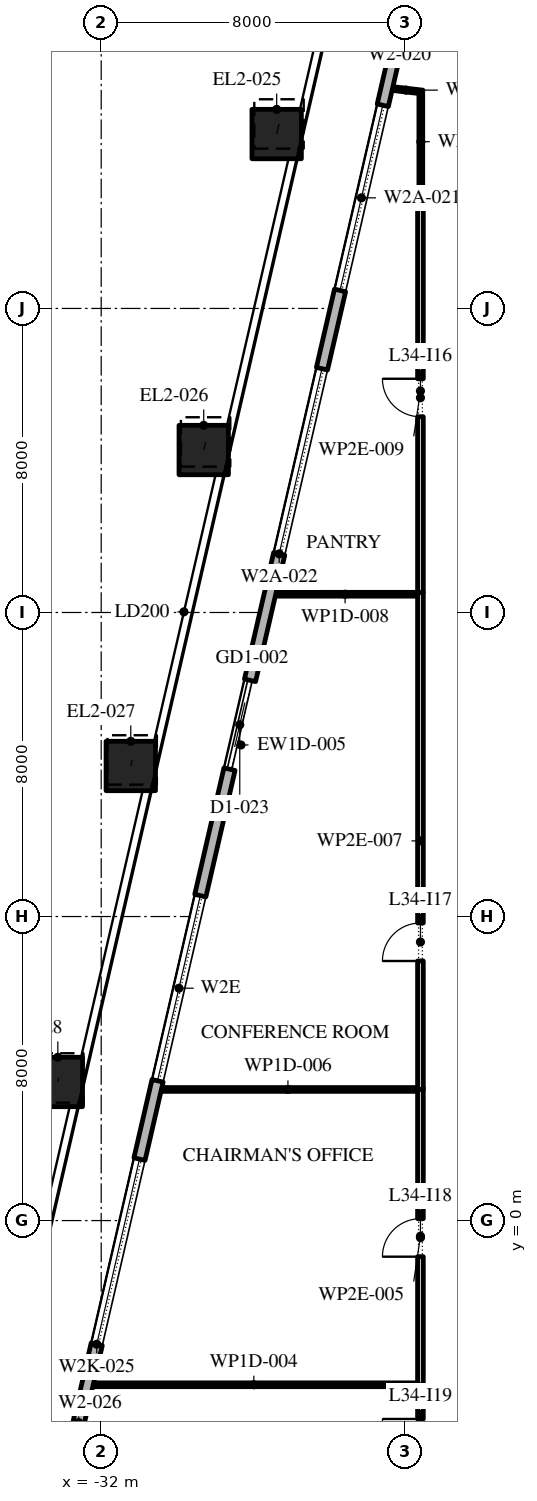
"""IFC4 building model, lengths in metres.
Left out: names, types, materials, properties, quantities, classifications, styles, units other than length and angle.
Written with IfcOpenShell. Run it as: python <this file> out.ifc"""

import sys

from ifc_helpers import new_model, si_unit, direction, frame, frame_2d, origin, origin_2d, place, context, subcontext, project, spatial, rectangle, extrude, element, fill, save


model = new_model("IFC4")
c1 = context("Model", 3, precision=1e-05, world=origin(), true_north=direction((0.0, 1.0)))
c2 = subcontext(c1, "Body", "Model", "MODEL_VIEW")
j1 = project(units=[si_unit("LENGTHUNIT", "METRE"), si_unit("PLANEANGLEUNIT", "RADIAN")], contexts=[c1])
p1 = place(None, origin())
s1 = spatial("IfcSite", under=j1, at=p1, CompositionType="ELEMENT")
p2 = place(p1, origin())
s2 = spatial("IfcBuilding", under=s1, at=p2, CompositionType="ELEMENT")
p3 = place(p2, frame((0.0, 0.0, 156.0)))
s3 = spatial("IfcBuildingStorey", under=s2, at=p3, CompositionType="ELEMENT", Elevation=156.0)
p4 = place(p3, frame((-27.383, 28.588, 0.0), z_axis=(0.014559841898, 0.063111984005, 0.997900239743), x_axis=(-0.97440628778, 0.224794097641, 0.0)))
e1 = element("IfcColumn", 1, at=p4, inside=s3, PredefinedType="COLUMN", context=c2, shape_type="SweptSolid", body=[
    extrude(rectangle(XDim=1.3, YDim=1.3, at=origin_2d()), origin(), (0.0, 0.0, 1.0), 4.209),
])
p5 = place(p3, frame((-29.302, 20.274, 0.0), z_axis=(0.011668267153, 0.050562490995, 0.998652735462), x_axis=(-0.974391195695, 0.224859506699, 0.0)))
e2 = element("IfcColumn", 2, at=p5, inside=s3, PredefinedType="COLUMN", context=c2, shape_type="SweptSolid", body=[
    extrude(rectangle(XDim=1.3, YDim=1.3, at=origin_2d()), origin(), (0.0, 0.0, 1.0), 4.206),
])
p6 = place(p3, frame((-31.222, 11.961, 0.0), z_axis=(0.00871280379, 0.037929739166, 0.999242424008), x_axis=(-0.974617095667, 0.223878352757, 0.0)))
e3 = element("IfcColumn", 3, at=p6, inside=s3, PredefinedType="COLUMN", context=c2, shape_type="SweptSolid", body=[
    extrude(rectangle(XDim=1.3, YDim=1.3, at=origin_2d()), origin(), (0.0, 0.0, 1.0), 4.203),
])
p7 = place(p3, frame((-33.141, 3.647, 0.0), z_axis=(0.005810975449, 0.025335852957, 0.999662106474), x_axis=(-0.974691740237, 0.22355315143, 0.0)))
e4 = element("IfcColumn", 4, at=p7, inside=s3, PredefinedType="COLUMN", context=c2, shape_type="SweptSolid", body=[
    extrude(rectangle(XDim=1.3, YDim=1.3, at=origin_2d()), origin(), (0.0, 0.0, 1.0), 4.201),
])
p8 = place(p3, frame((-24.416, 29.795, 0.0), z_axis=(0.0, 0.0, 1.0), x_axis=(0.993440426076, -0.114350862868, 0.0)))
e5 = element("IfcWall", 5, at=p8, inside=s3, PredefinedType="PARTITIONING", context=c2, shape_type="SweptSolid", body=[
    extrude(rectangle(XDim=0.882, YDim=0.1, at=frame_2d((0.441, 0.0))), origin(), (0.0, 0.0, 1.0), 3.9),
])
p9 = place(p3, frame((-23.6, -7.375, 0.0), z_axis=(0.0, 0.0, 1.0), x_axis=(0.0, 1.0, 0.0)))
e6 = element("IfcWall", 6, at=p9, inside=s3, PredefinedType="PARTITIONING", context=c2, shape_type="SweptSolid", body=[
    extrude(rectangle(XDim=3.055, YDim=0.15, at=frame_2d((1.527, 0.0))), origin(), (0.0, 0.0, 1.0), 3.9),
])
p10 = place(p9, frame((1.155, 0.0, 0.0)))
e7 = element("IfcOpeningElement", 7, at=p10, cuts=e6, PredefinedType="OPENING", context=c2, shape_type="SweptSolid", body=[
    extrude(rectangle(XDim=1.0, YDim=2.1, at=frame_2d((0.5, 1.05))), frame((0.0, 0.085, 0.0), z_axis=(0.0, -1.0, 0.0), x_axis=(1.0, 0.0, 0.0)), (0.0, 0.0, 1.0), 0.17),
])
p11 = place(p3, frame((-23.675, -4.32, 0.0), z_axis=(0.0, 0.0, 1.0), x_axis=(-1.0, 0.0, 0.0)))
e8 = element("IfcWall", 8, at=p11, inside=s3, PredefinedType="PARTITIONING", context=c2, shape_type="SweptSolid", body=[
    extrude(rectangle(XDim=8.617, YDim=0.1, at=frame_2d((4.309, 0.0))), origin(), (0.0, 0.0, 1.0), 3.9),
])
p12 = place(p3, frame((-23.6, -4.32, 0.0), z_axis=(0.0, 0.0, 1.0), x_axis=(0.0, 1.0, 0.0)))
e9 = element("IfcWall", 9, at=p12, inside=s3, PredefinedType="PARTITIONING", context=c2, shape_type="SweptSolid", body=[
    extrude(rectangle(XDim=7.82, YDim=0.15, at=frame_2d((3.91, 0.0))), origin(), (0.0, 0.0, 1.0), 3.9),
])
p13 = place(p12, frame((3.37, 0.0, 0.0)))
e10 = element("IfcOpeningElement", 10, at=p13, cuts=e9, PredefinedType="OPENING", context=c2, shape_type="SweptSolid", body=[
    extrude(rectangle(XDim=1.0, YDim=2.1, at=frame_2d((0.5, 1.05))), frame((0.0, 0.085, 0.0), z_axis=(0.0, -1.0, 0.0), x_axis=(1.0, 0.0, 0.0)), (0.0, 0.0, 1.0), 0.17),
])
p14 = place(p3, frame((-23.675, 3.45, 0.0), z_axis=(0.0, 0.0, 1.0), x_axis=(-1.0, 0.0, 0.0)))
e11 = element("IfcWall", 11, at=p14, inside=s3, PredefinedType="PARTITIONING", context=c2, shape_type="SweptSolid", body=[
    extrude(rectangle(XDim=6.823, YDim=0.1, at=frame_2d((3.412, 0.0))), origin(), (0.0, 0.0, 1.0), 3.9),
])
p15 = place(p3, frame((-23.6, 3.45, 0.0), z_axis=(0.0, 0.0, 1.0), x_axis=(0.0, 1.0, 0.0)))
e12 = element("IfcWall", 12, at=p15, inside=s3, PredefinedType="PARTITIONING", context=c2, shape_type="SweptSolid", body=[
    extrude(rectangle(XDim=13.08, YDim=0.15, at=frame_2d((6.54, 0.0))), origin(), (0.0, 0.0, 1.0), 3.9),
])
p16 = place(p15, frame((3.38, 0.0, 0.0)))
e13 = element("IfcOpeningElement", 13, at=p16, cuts=e12, PredefinedType="OPENING", context=c2, shape_type="SweptSolid", body=[
    extrude(rectangle(XDim=1.0, YDim=2.1, at=frame_2d((0.5, 1.05))), frame((0.0, 0.085, 0.0), z_axis=(0.0, -1.0, 0.0), x_axis=(1.0, 0.0, 0.0)), (0.0, 0.0, 1.0), 0.17),
])
p17 = place(p3, frame((-23.675, 16.48, 0.0), z_axis=(0.0, 0.0, 1.0), x_axis=(-1.0, 0.0, 0.0)))
e14 = element("IfcWall", 14, at=p17, inside=s3, PredefinedType="PARTITIONING", context=c2, shape_type="SweptSolid", body=[
    extrude(rectangle(XDim=3.815, YDim=0.1, at=frame_2d((1.907, 0.0))), origin(), (0.0, 0.0, 1.0), 3.9),
])
p18 = place(p3, frame((-23.6, 16.53, 0.0), z_axis=(0.0, 0.0, 1.0), x_axis=(0.0, 1.0, 0.0)))
e15 = element("IfcWall", 15, at=p18, inside=s3, PredefinedType="PARTITIONING", context=c2, shape_type="SweptSolid", body=[
    extrude(rectangle(XDim=10.595, YDim=0.15, at=frame_2d((5.297, 0.0))), origin(), (0.0, 0.0, 1.0), 3.9),
])
p19 = place(p18, frame((4.62, 0.0, 0.0)))
e16 = element("IfcOpeningElement", 16, at=p19, cuts=e15, PredefinedType="OPENING", context=c2, shape_type="SweptSolid", body=[
    extrude(rectangle(XDim=1.0, YDim=2.1, at=frame_2d((0.5, 1.05))), frame((0.0, 0.085, 0.0), z_axis=(0.0, -1.0, 0.0), x_axis=(1.0, 0.0, 0.0)), (0.0, 0.0, 1.0), 0.17),
])
p20 = place(p3, frame((-23.59, 27.125, 0.0), z_axis=(0.0, 0.0, 1.0), x_axis=(0.0, 1.0, 0.0)))
e17 = element("IfcWall", 17, at=p20, inside=s3, PredefinedType="PARTITIONING", context=c2, shape_type="SweptSolid", body=[
    extrude(rectangle(XDim=2.525, YDim=0.1, at=frame_2d((1.262, 0.0))), origin(), (0.0, 0.0, 1.0), 3.9),
])
p21 = place(p3, frame((-23.515, 27.05, 0.0), z_axis=(0.0, 0.0, 1.0), x_axis=(1.0, 0.0, 0.0)))
e18 = element("IfcWall", 18, at=p21, inside=s3, PredefinedType="PARTITIONING", context=c2, shape_type="SweptSolid", body=[
    extrude(rectangle(XDim=8.895, YDim=0.15, at=frame_2d((4.447, 0.0))), origin(), (0.0, 0.0, 1.0), 3.9),
])
p22 = place(p21, frame((4.695, 0.0, 0.0)))
e19 = element("IfcOpeningElement", 19, at=p22, cuts=e18, PredefinedType="OPENING", context=c2, shape_type="SweptSolid", body=[
    extrude(rectangle(XDim=1.0, YDim=2.1, at=frame_2d((0.5, 1.05))), frame((0.0, 0.085, 0.0), z_axis=(0.0, -1.0, 0.0), x_axis=(1.0, 0.0, 0.0)), (0.0, 0.0, 1.0), 0.17),
])
p23 = place(p3, frame((-22.983, 36.311, 0.0), z_axis=(0.0, 0.0, 1.0), x_axis=(-0.224952722155, -0.974369679739, 0.0)))
e20 = element("IfcWall", 20, at=p23, inside=s3, PredefinedType="STANDARD", context=c2, shape_type="SweptSolid", body=[
    extrude(rectangle(XDim=48.777, YDim=0.3, at=frame_2d((24.388, 0.0))), origin(), (0.0, 0.0, 1.0), 3.9),
])
p24 = place(p23, frame((0.184, 0.0, 0.45)))
e21 = element("IfcOpeningElement", 21, at=p24, cuts=e20, PredefinedType="OPENING", context=c2, shape_type="SweptSolid", body=[
    extrude(rectangle(XDim=5.0, YDim=3.25, at=frame_2d((2.5, 1.625))), frame((0.0, 0.16, 0.0), z_axis=(0.0, -1.0, 0.0), x_axis=(1.0, 0.0, 0.0)), (0.0, 0.0, 1.0), 0.32),
])
p25 = place(p23, frame((7.148, 0.0, 0.45)))
e22 = element("IfcOpeningElement", 22, at=p25, cuts=e20, PredefinedType="OPENING", context=c2, shape_type="SweptSolid", body=[
    extrude(rectangle(XDim=5.0, YDim=2.95, at=frame_2d((2.5, 1.475))), frame((0.0, 0.16, 0.0), z_axis=(0.0, -1.0, 0.0), x_axis=(1.0, 0.0, 0.0)), (0.0, 0.0, 1.0), 0.32),
])
p26 = place(p23, frame((14.262, 0.0, 0.45)))
e23 = element("IfcOpeningElement", 23, at=p26, cuts=e20, PredefinedType="OPENING", context=c2, shape_type="SweptSolid", body=[
    extrude(rectangle(XDim=5.0, YDim=2.95, at=frame_2d((2.5, 1.475))), frame((0.0, 0.16, 0.0), z_axis=(0.0, -1.0, 0.0), x_axis=(1.0, 0.0, 0.0)), (0.0, 0.0, 1.0), 0.32),
])
p27 = place(p23, frame((22.677, 0.0, 0.0)))
e24 = element("IfcOpeningElement", 24, at=p27, cuts=e20, PredefinedType="OPENING", context=c2, shape_type="SweptSolid", body=[
    extrude(rectangle(XDim=2.4, YDim=3.5, at=frame_2d((1.2, 1.75))), frame((0.0, 0.16, 0.0), z_axis=(0.0, -1.0, 0.0), x_axis=(1.0, 0.0, 0.0)), (0.0, 0.0, 1.0), 0.32),
])
p28 = place(p23, frame((28.491, 0.0, 0.45)))
e25 = element("IfcOpeningElement", 25, at=p28, cuts=e20, PredefinedType="OPENING", context=c2, shape_type="SweptSolid", body=[
    extrude(rectangle(XDim=5.0, YDim=2.775, at=frame_2d((2.5, 1.387))), frame((0.0, 0.16, 0.0), z_axis=(0.0, -1.0, 0.0), x_axis=(1.0, 0.0, 0.0)), (0.0, 0.0, 1.0), 0.32),
])
p29 = place(p23, frame((35.605, 0.0, 0.45)))
e26 = element("IfcOpeningElement", 26, at=p29, cuts=e20, PredefinedType="OPENING", context=c2, shape_type="SweptSolid", body=[
    extrude(rectangle(XDim=5.0, YDim=2.575, at=frame_2d((2.5, 1.288))), frame((0.0, 0.16, 0.0), z_axis=(0.0, -1.0, 0.0), x_axis=(1.0, 0.0, 0.0)), (0.0, 0.0, 1.0), 0.32),
])
p30 = place(p23, frame((42.719, 0.0, 0.45)))
e27 = element("IfcOpeningElement", 27, at=p30, cuts=e20, PredefinedType="OPENING", context=c2, shape_type="SweptSolid", body=[
    extrude(rectangle(XDim=5.0, YDim=3.25, at=frame_2d((2.5, 1.625))), frame((0.0, 0.16, 0.0), z_axis=(0.0, -1.0, 0.0), x_axis=(1.0, 0.0, 0.0)), (0.0, 0.0, 1.0), 0.32),
])
p31 = place(p25, origin())
e28 = element("IfcWindow", 28, at=p31, inside=s3, PartitioningType="DOUBLE_PANEL_VERTICAL", PredefinedType="WINDOW", context=c2, shape_type="SweptSolid", body=[
    extrude(rectangle(XDim=5.0, YDim=2.95, at=frame_2d((2.5, 1.475))), frame((0.0, 0.03, 0.0), z_axis=(0.0, -1.0, 0.0), x_axis=(1.0, 0.0, 0.0)), (0.0, 0.0, 1.0), 0.06),
])
fill(e22, e28)
p32 = place(p26, origin())
e29 = element("IfcWindow", 29, at=p32, inside=s3, PartitioningType="DOUBLE_PANEL_VERTICAL", PredefinedType="WINDOW", context=c2, shape_type="SweptSolid", body=[
    extrude(rectangle(XDim=5.0, YDim=2.95, at=frame_2d((2.5, 1.475))), frame((0.0, 0.03, 0.0), z_axis=(0.0, -1.0, 0.0), x_axis=(1.0, 0.0, 0.0)), (0.0, 0.0, 1.0), 0.06),
])
fill(e23, e29)
p33 = place(p27, origin())
e30 = element("IfcDoor", 30, at=p33, inside=s3, OperationType="DOUBLE_DOOR_SLIDING", PredefinedType="DOOR", context=c2, shape_type="SweptSolid", body=[
    extrude(rectangle(XDim=2.4, YDim=3.5, at=frame_2d((1.2, 1.75))), frame((0.0, 0.025, 0.0), z_axis=(0.0, -1.0, 0.0), x_axis=(1.0, 0.0, 0.0)), (0.0, 0.0, 1.0), 0.05),
])
fill(e24, e30)
p34 = place(p28, origin())
e31 = element("IfcWindow", 31, at=p34, inside=s3, PartitioningType="DOUBLE_PANEL_VERTICAL", PredefinedType="WINDOW", context=c2, shape_type="SweptSolid", body=[
    extrude(rectangle(XDim=5.0, YDim=2.775, at=frame_2d((2.5, 1.387))), frame((0.0, 0.03, 0.0), z_axis=(0.0, -1.0, 0.0), x_axis=(1.0, 0.0, 0.0)), (0.0, 0.0, 1.0), 0.06),
])
fill(e25, e31)
p35 = place(p29, origin())
e32 = element("IfcWindow", 32, at=p35, inside=s3, PartitioningType="DOUBLE_PANEL_VERTICAL", PredefinedType="WINDOW", context=c2, shape_type="SweptSolid", body=[
    extrude(rectangle(XDim=5.0, YDim=2.575, at=frame_2d((2.5, 1.288))), frame((0.0, 0.03, 0.0), z_axis=(0.0, -1.0, 0.0), x_axis=(1.0, 0.0, 0.0)), (0.0, 0.0, 1.0), 0.06),
])
fill(e26, e32)
p36 = place(p19, origin())
e33 = element("IfcDoor", 33, at=p36, inside=s3, OperationType="SINGLE_SWING_LEFT", PredefinedType="DOOR", context=c2, shape_type="SweptSolid", body=[
    extrude(rectangle(XDim=1.0, YDim=2.1, at=frame_2d((0.5, 1.05))), frame((0.0, 0.025, 0.0), z_axis=(0.0, -1.0, 0.0), x_axis=(1.0, 0.0, 0.0)), (0.0, 0.0, 1.0), 0.05),
])
fill(e16, e33)
p37 = place(p16, origin())
e34 = element("IfcDoor", 34, at=p37, inside=s3, OperationType="SINGLE_SWING_RIGHT", PredefinedType="DOOR", context=c2, shape_type="SweptSolid", body=[
    extrude(rectangle(XDim=1.0, YDim=2.1, at=frame_2d((0.5, 1.05))), frame((0.0, 0.025, 0.0), z_axis=(0.0, -1.0, 0.0), x_axis=(1.0, 0.0, 0.0)), (0.0, 0.0, 1.0), 0.05),
])
fill(e13, e34)
p38 = place(p13, origin())
e35 = element("IfcDoor", 35, at=p38, inside=s3, OperationType="SINGLE_SWING_RIGHT", PredefinedType="DOOR", context=c2, shape_type="SweptSolid", body=[
    extrude(rectangle(XDim=1.0, YDim=2.1, at=frame_2d((0.5, 1.05))), frame((0.0, 0.025, 0.0), z_axis=(0.0, -1.0, 0.0), x_axis=(1.0, 0.0, 0.0)), (0.0, 0.0, 1.0), 0.05),
])
fill(e10, e35)
p39 = place(p10, origin())
e36 = element("IfcDoor", 36, at=p39, inside=s3, OperationType="SINGLE_SWING_LEFT", PredefinedType="DOOR", context=c2, shape_type="SweptSolid", body=[
    extrude(rectangle(XDim=1.0, YDim=2.1, at=frame_2d((0.5, 1.05))), frame((0.0, 0.025, 0.0), z_axis=(0.0, -1.0, 0.0), x_axis=(1.0, 0.0, 0.0)), (0.0, 0.0, 1.0), 0.05),
])
fill(e7, e36)
save(model, sys.argv[1])
